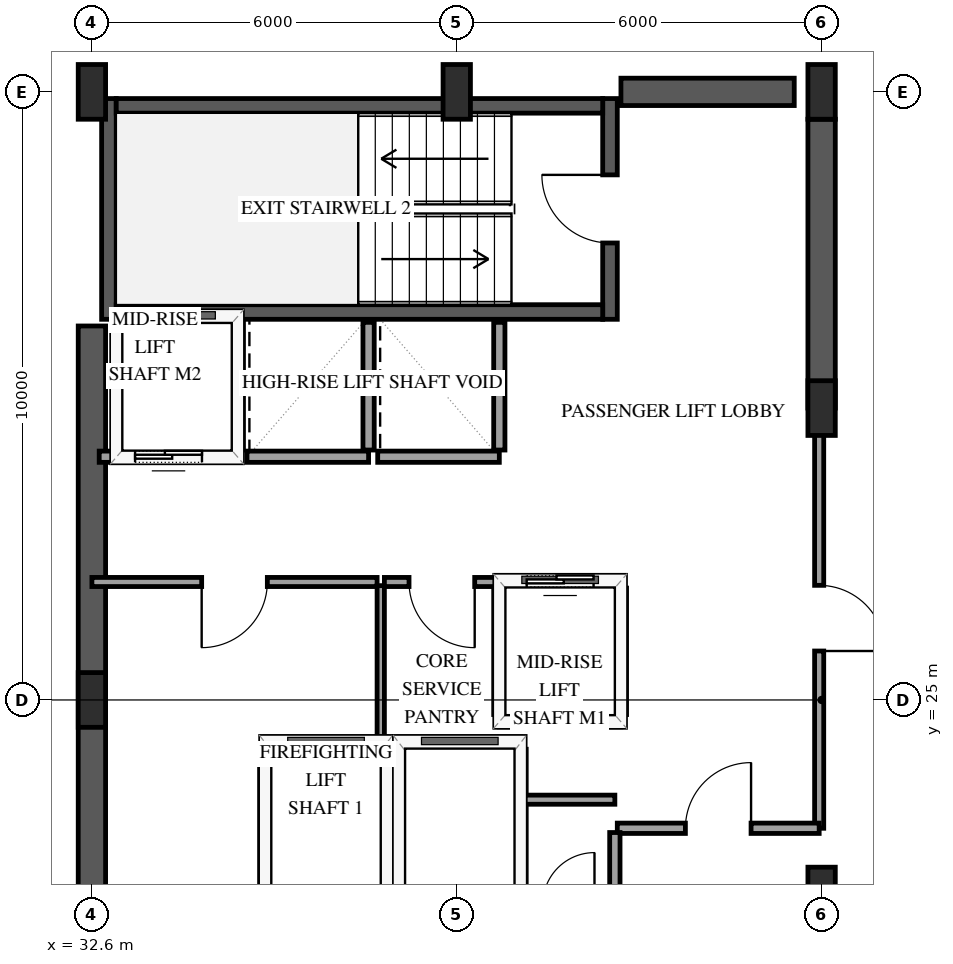
"""IFC4 building model, lengths in metres.
Left out: names, types, materials, properties, quantities, classifications, styles, units other than length and angle.
Written with IfcOpenShell. Run it as: python <this file> out.ifc"""

import sys

from ifc_helpers import new_model, si_unit, direction, frame, frame_2d, origin, origin_2d, place, context, subcontext, project, spatial, rectangle, extrude, element, fill, save


model = new_model("IFC4")
c1 = context("Model", 3, precision=1e-05, world=origin(), true_north=direction((0.0, 1.0)))
c2 = subcontext(c1, "Body", "Model", "MODEL_VIEW")
j1 = project(units=[si_unit("LENGTHUNIT", "METRE"), si_unit("PLANEANGLEUNIT", "RADIAN")], contexts=[c1])
p1 = place(None, origin())
s1 = spatial("IfcSite", under=j1, at=p1, CompositionType="ELEMENT")
p2 = place(p1, origin())
s2 = spatial("IfcBuilding", under=s1, at=p2, CompositionType="ELEMENT")
p3 = place(p2, frame((0.0, 0.0, 212.2)))
s3 = spatial("IfcBuildingStorey", under=s2, at=p3, CompositionType="ELEMENT", Elevation=212.2)
p4 = place(p3, frame((32.88, 31.26, 0.0), z_axis=(0.0, 0.0, 1.0), x_axis=(0.0, 1.0, 0.0)))
e1 = element("IfcWall", 1, at=p4, inside=s3, PredefinedType="SHEAR", context=c2, shape_type="SweptSolid", body=[
    extrude(rectangle(XDim=3.63, YDim=0.24, at=frame_2d((1.815, 0.0))), origin(), (0.0, 0.0, 1.0), 3.6),
])
p5 = place(p3, frame((41.12, 31.26, 0.0), z_axis=(0.0, 0.0, 1.0), x_axis=(0.0, 1.0, 0.0)))
e2 = element("IfcWall", 2, at=p5, inside=s3, PredefinedType="SHEAR", context=c2, shape_type="SweptSolid", body=[
    extrude(rectangle(XDim=3.63, YDim=0.24, at=frame_2d((1.815, 0.0))), origin(), (0.0, 0.0, 1.0), 3.6),
])
p6 = place(p5, frame((1.255, 0.0, 0.0)))
e3 = element("IfcOpeningElement", 3, at=p6, cuts=e2, PredefinedType="OPENING", context=c2, shape_type="SweptSolid", body=[
    extrude(rectangle(XDim=1.12, YDim=2.15, at=frame_2d((0.56, 1.075))), frame((0.0, 0.13, 0.0), z_axis=(0.0, -1.0, 0.0), x_axis=(1.0, 0.0, 0.0)), (0.0, 0.0, 1.0), 0.26),
])
for number, where, z_axis, x_axis in (
    (4, (33.0, 31.38, 0.0), (0.0, 0.0, 1.0), (1.0, 0.0, 0.0)),
    (5, (33.0, 34.77, 0.0), (0.0, 0.0, 1.0), (1.0, 0.0, 0.0)),
):
    element("IfcWall", number, at=place(p3, frame(where, z_axis=z_axis, x_axis=x_axis)), inside=s3, PredefinedType="SHEAR", context=c2, shape_type="SweptSolid", body=[
        extrude(rectangle(XDim=8.0, YDim=0.24, at=frame_2d((4.0, 0.0))), origin(), (0.0, 0.0, 1.0), 3.6),
    ])
p7 = place(p3, frame((32.6, 18.85, 0.0), z_axis=(0.0, 0.0, 1.0), x_axis=(0.0, 1.0, 0.0)))
e6 = element("IfcWall", 6, at=p7, inside=s3, PredefinedType="SHEAR", context=c2, shape_type="SweptSolid", body=[
    extrude(rectangle(XDim=12.3, YDim=0.45, at=frame_2d((6.15, 0.0))), origin(), (0.0, 0.0, 1.0), 3.6),
])
p8 = place(p3, frame((41.3, 35.0, 0.0), z_axis=(0.0, 0.0, 1.0), x_axis=(1.0, 0.0, 0.0)))
e7 = element("IfcWall", 7, at=p8, inside=s3, PredefinedType="SHEAR", context=c2, shape_type="SweptSolid", body=[
    extrude(rectangle(XDim=2.85, YDim=0.45, at=frame_2d((1.425, 0.0))), origin(), (0.0, 0.0, 1.0), 3.6),
])
p9 = place(p3, frame((44.6, 29.8, 0.0), z_axis=(0.0, 0.0, 1.0), x_axis=(0.0, 1.0, 0.0)))
e8 = element("IfcWall", 8, at=p9, inside=s3, PredefinedType="SHEAR", context=c2, shape_type="SweptSolid", body=[
    extrude(rectangle(XDim=4.75, YDim=0.45, at=frame_2d((2.375, 0.0))), origin(), (0.0, 0.0, 1.0), 3.6),
])
for number, where, z_axis, x_axis in (
    (9, (32.6, 25.0, 0.0), (0.0, 0.0, 1.0), (1.0, 0.0, 0.0)),
    (10, (32.6, 35.0, 0.0), (0.0, 0.0, 1.0), (1.0, 0.0, 0.0)),
    (11, (38.6, 35.0, 0.0), (0.0, 0.0, 1.0), (1.0, 0.0, 0.0)),
    (12, (44.6, 21.8, 0.0), (0.0, 0.0, 1.0), (1.0, 0.0, 0.0)),
    (13, (44.6, 29.8, 0.0), (0.0, 0.0, 1.0), (1.0, 0.0, 0.0)),
    (14, (44.6, 35.0, 0.0), (0.0, 0.0, 1.0), (1.0, 0.0, 0.0)),
):
    element("IfcColumn", number, at=place(p3, frame(where, z_axis=z_axis, x_axis=x_axis)), inside=s3, PredefinedType="PILASTER", context=c2, shape_type="SweptSolid", body=[
        extrude(rectangle(XDim=0.45, YDim=0.9, at=origin_2d()), origin(), (0.0, 0.0, 1.0), 3.6),
    ])
p10 = place(p3, frame((35.45, 24.3, 0.0), z_axis=(0.0, 0.0, 1.0), x_axis=(1.0, 0.0, 0.0)))
e15 = element("IfcWall", 15, at=p10, inside=s3, PredefinedType="SOLIDWALL", context=c2, shape_type="SweptSolid", body=[
    extrude(rectangle(XDim=2.0, YDim=0.185, at=frame_2d((1.0, 0.0))), origin(), (0.0, 0.0, 1.0), 3.3),
])
for number, where, z_axis, x_axis in (
    (16, (35.45, 21.81, 0.0), (0.0, 0.0, 1.0), (0.0, 1.0, 0.0)),
    (17, (37.45, 21.81, 0.0), (0.0, 0.0, 1.0), (0.0, 1.0, 0.0)),
):
    element("IfcWall", number, at=place(p3, frame(where, z_axis=z_axis, x_axis=x_axis)), inside=s3, PredefinedType="SOLIDWALL", context=c2, shape_type="SweptSolid", body=[
        extrude(rectangle(XDim=2.38, YDim=0.185, at=frame_2d((1.19, 0.0))), origin(), (0.0, 0.0, 1.0), 3.3),
    ])
p11 = place(p3, frame((37.65, 24.3, 0.0), z_axis=(0.0, 0.0, 1.0), x_axis=(1.0, 0.0, 0.0)))
e18 = element("IfcWall", 18, at=p11, inside=s3, PredefinedType="SOLIDWALL", context=c2, shape_type="SweptSolid", body=[
    extrude(rectangle(XDim=2.0, YDim=0.185, at=frame_2d((1.0, 0.0))), origin(), (0.0, 0.0, 1.0), 3.3),
])
p12 = place(p3, frame((39.65, 21.81, 0.0), z_axis=(0.0, 0.0, 1.0), x_axis=(0.0, 1.0, 0.0)))
e19 = element("IfcWall", 19, at=p12, inside=s3, PredefinedType="SOLIDWALL", context=c2, shape_type="SweptSolid", body=[
    extrude(rectangle(XDim=2.38, YDim=0.185, at=frame_2d((1.19, 0.0))), origin(), (0.0, 0.0, 1.0), 3.3),
])
p13 = place(p3, frame((39.3, 24.65, 0.0), z_axis=(0.0, 0.0, 1.0), x_axis=(1.0, 0.0, 0.0)))
e20 = element("IfcWall", 20, at=p13, inside=s3, PredefinedType="SOLIDWALL", context=c2, shape_type="SweptSolid", body=[
    extrude(rectangle(XDim=2.0, YDim=0.185, at=frame_2d((1.0, 0.0))), origin(), (0.0, 0.0, 1.0), 3.3),
])
p14 = place(p3, frame((39.3, 26.95, 0.0), z_axis=(0.0, 0.0, 1.0), x_axis=(1.0, 0.0, 0.0)))
e21 = element("IfcWall", 21, at=p14, inside=s3, PredefinedType="SOLIDWALL", context=c2, shape_type="SweptSolid", body=[
    extrude(rectangle(XDim=2.0, YDim=0.185, at=frame_2d((1.0, 0.0))), origin(), (0.0, 0.0, 1.0), 3.3),
])
p15 = place(p14, frame((0.45, 0.0, 0.0)))
e22 = element("IfcOpeningElement", 22, at=p15, cuts=e21, PredefinedType="OPENING", context=c2, shape_type="SweptSolid", body=[
    extrude(rectangle(XDim=1.1, YDim=2.15, at=frame_2d((0.55, 1.075))), frame((0.0, 0.103, 0.0), z_axis=(0.0, -1.0, 0.0), x_axis=(1.0, 0.0, 0.0)), (0.0, 0.0, 1.0), 0.205),
])
for number, where, z_axis, x_axis in (
    (23, (39.3, 24.76, 0.0), (0.0, 0.0, 1.0), (0.0, 1.0, 0.0)),
    (24, (41.3, 24.76, 0.0), (0.0, 0.0, 1.0), (0.0, 1.0, 0.0)),
):
    element("IfcWall", number, at=place(p3, frame(where, z_axis=z_axis, x_axis=x_axis)), inside=s3, PredefinedType="SOLIDWALL", context=c2, shape_type="SweptSolid", body=[
        extrude(rectangle(XDim=2.08, YDim=0.185, at=frame_2d((1.04, 0.0))), origin(), (0.0, 0.0, 1.0), 3.3),
    ])
p16 = place(p3, frame((32.72, 29.0, 0.0), z_axis=(0.0, 0.0, 1.0), x_axis=(1.0, 0.0, 0.0)))
e25 = element("IfcWall", 25, at=p16, inside=s3, PredefinedType="SOLIDWALL", context=c2, shape_type="SweptSolid", body=[
    extrude(rectangle(XDim=2.28, YDim=0.185, at=frame_2d((1.14, 0.0))), origin(), (0.0, 0.0, 1.0), 3.3),
])
p17 = place(p16, frame((0.59, 0.0, 0.0)))
e26 = element("IfcOpeningElement", 26, at=p17, cuts=e25, PredefinedType="OPENING", context=c2, shape_type="SweptSolid", body=[
    extrude(rectangle(XDim=1.1, YDim=2.15, at=frame_2d((0.55, 1.075))), frame((0.0, 0.103, 0.0), z_axis=(0.0, -1.0, 0.0), x_axis=(1.0, 0.0, 0.0)), (0.0, 0.0, 1.0), 0.205),
])
p18 = place(p3, frame((35.0, 29.11, 0.0), z_axis=(0.0, 0.0, 1.0), x_axis=(0.0, 1.0, 0.0)))
e27 = element("IfcWall", 27, at=p18, inside=s3, PredefinedType="SOLIDWALL", context=c2, shape_type="SweptSolid", body=[
    extrude(rectangle(XDim=2.1, YDim=0.185, at=frame_2d((1.05, 0.0))), origin(), (0.0, 0.0, 1.0), 3.3),
])
p19 = place(p3, frame((35.15, 29.0, 0.0), z_axis=(0.0, 0.0, 1.0), x_axis=(1.0, 0.0, 0.0)))
e28 = element("IfcWall", 28, at=p19, inside=s3, PredefinedType="SOLIDWALL", context=c2, shape_type="SweptSolid", body=[
    extrude(rectangle(XDim=2.0, YDim=0.185, at=frame_2d((1.0, 0.0))), origin(), (0.0, 0.0, 1.0), 3.3),
])
p20 = place(p3, frame((37.15, 29.11, 0.0), z_axis=(0.0, 0.0, 1.0), x_axis=(0.0, 1.0, 0.0)))
e29 = element("IfcWall", 29, at=p20, inside=s3, PredefinedType="SOLIDWALL", context=c2, shape_type="SweptSolid", body=[
    extrude(rectangle(XDim=2.1, YDim=0.185, at=frame_2d((1.05, 0.0))), origin(), (0.0, 0.0, 1.0), 3.3),
])
p21 = place(p3, frame((37.3, 29.0, 0.0), z_axis=(0.0, 0.0, 1.0), x_axis=(1.0, 0.0, 0.0)))
e30 = element("IfcWall", 30, at=p21, inside=s3, PredefinedType="SOLIDWALL", context=c2, shape_type="SweptSolid", body=[
    extrude(rectangle(XDim=2.0, YDim=0.185, at=frame_2d((1.0, 0.0))), origin(), (0.0, 0.0, 1.0), 3.3),
])
p22 = place(p3, frame((39.3, 29.11, 0.0), z_axis=(0.0, 0.0, 1.0), x_axis=(0.0, 1.0, 0.0)))
e31 = element("IfcWall", 31, at=p22, inside=s3, PredefinedType="SOLIDWALL", context=c2, shape_type="SweptSolid", body=[
    extrude(rectangle(XDim=2.1, YDim=0.185, at=frame_2d((1.05, 0.0))), origin(), (0.0, 0.0, 1.0), 3.3),
])
p23 = place(p3, frame((44.56, 29.8, 0.0), z_axis=(0.0, 0.0, 1.0), x_axis=(0.0, -1.0, 0.0)))
e32 = element("IfcWall", 32, at=p23, inside=s3, PredefinedType="PARTITIONING", context=c2, shape_type="SweptSolid", body=[
    extrude(rectangle(XDim=6.91, YDim=0.15, at=frame_2d((3.455, 0.0))), origin(), (0.0, 0.0, 1.0), 2.34),
])
p24 = place(p23, frame((2.915, 0.0, 0.0)))
e33 = element("IfcOpeningElement", 33, at=p24, cuts=e32, PredefinedType="OPENING", context=c2, shape_type="SweptSolid", body=[
    extrude(rectangle(XDim=1.08, YDim=2.15, at=frame_2d((0.54, 1.075))), frame((0.0, 0.085, 0.0), z_axis=(0.0, -1.0, 0.0), x_axis=(1.0, 0.0, 0.0)), (0.0, 0.0, 1.0), 0.17),
])
p25 = place(p3, frame((37.29, 26.94, 0.0), z_axis=(0.0, 0.0, 1.0), x_axis=(-1.0, 0.0, 0.0)))
e34 = element("IfcWall", 34, at=p25, inside=s3, PredefinedType="PARTITIONING", context=c2, shape_type="SweptSolid", body=[
    extrude(rectangle(XDim=4.69, YDim=0.15, at=frame_2d((2.345, 0.0))), origin(), (0.0, 0.0, 1.0), 3.3),
])
p26 = place(p25, frame((1.805, 0.0, 0.0)))
e35 = element("IfcOpeningElement", 35, at=p26, cuts=e34, PredefinedType="OPENING", context=c2, shape_type="SweptSolid", body=[
    extrude(rectangle(XDim=1.08, YDim=2.15, at=frame_2d((0.54, 1.075))), frame((0.0, 0.085, 0.0), z_axis=(0.0, -1.0, 0.0), x_axis=(1.0, 0.0, 0.0)), (0.0, 0.0, 1.0), 0.17),
])
p27 = place(p3, frame((41.24, 22.89, 0.0), z_axis=(0.0, 0.0, 1.0), x_axis=(1.0, 0.0, 0.0)))
e36 = element("IfcWall", 36, at=p27, inside=s3, PredefinedType="PARTITIONING", context=c2, shape_type="SweptSolid", body=[
    extrude(rectangle(XDim=3.32, YDim=0.17, at=frame_2d((1.66, 0.0))), origin(), (0.0, 0.0, 1.0), 3.3),
])
p28 = place(p27, frame((1.12, 0.0, 0.0)))
e37 = element("IfcOpeningElement", 37, at=p28, cuts=e36, PredefinedType="OPENING", context=c2, shape_type="SweptSolid", body=[
    extrude(rectangle(XDim=1.08, YDim=2.15, at=frame_2d((0.54, 1.075))), frame((0.0, 0.095, 0.0), z_axis=(0.0, -1.0, 0.0), x_axis=(1.0, 0.0, 0.0)), (0.0, 0.0, 1.0), 0.19),
])
p29 = place(p3, frame((37.35, 26.88, 0.0), z_axis=(0.0, 0.0, 1.0), x_axis=(0.0, -1.0, 0.0)))
e38 = element("IfcWall", 38, at=p29, inside=s3, PredefinedType="PARTITIONING", context=c2, shape_type="SweptSolid", body=[
    extrude(rectangle(XDim=2.58, YDim=0.12, at=frame_2d((1.29, 0.0))), origin(), (0.0, 0.0, 1.0), 3.3),
])
p30 = place(p3, frame((39.3, 26.94, 0.0), z_axis=(0.0, 0.0, 1.0), x_axis=(-1.0, 0.0, 0.0)))
e39 = element("IfcWall", 39, at=p30, inside=s3, PredefinedType="PARTITIONING", context=c2, shape_type="SweptSolid", body=[
    extrude(rectangle(XDim=1.89, YDim=0.15, at=frame_2d((0.945, 0.0))), origin(), (0.0, 0.0, 1.0), 3.3),
])
p31 = place(p30, frame((0.405, 0.0, 0.0)))
e40 = element("IfcOpeningElement", 40, at=p31, cuts=e39, PredefinedType="OPENING", context=c2, shape_type="SweptSolid", body=[
    extrude(rectangle(XDim=1.08, YDim=2.15, at=frame_2d((0.54, 1.075))), frame((0.0, 0.085, 0.0), z_axis=(0.0, -1.0, 0.0), x_axis=(1.0, 0.0, 0.0)), (0.0, 0.0, 1.0), 0.17),
])
p32 = place(p3, frame((41.2, 21.7, 0.0), z_axis=(0.0, 0.0, 1.0), x_axis=(0.0, 1.0, 0.0)))
e41 = element("IfcWall", 41, at=p32, inside=s3, PredefinedType="PARTITIONING", context=c2, shape_type="SweptSolid", body=[
    extrude(rectangle(XDim=1.12, YDim=0.17, at=frame_2d((0.56, 0.0))), origin(), (0.0, 0.0, 1.0), 3.3),
])
p33 = place(p3, frame((41.2, 23.36, 0.0), z_axis=(0.0, 0.0, 1.0), x_axis=(-1.0, 0.0, 0.0)))
e42 = element("IfcWall", 42, at=p33, inside=s3, PredefinedType="PARTITIONING", context=c2, shape_type="SweptSolid", body=[
    extrude(rectangle(XDim=1.48, YDim=0.15, at=frame_2d((0.74, 0.0))), origin(), (0.0, 0.0, 1.0), 3.3),
])
p34 = place(p15, origin())
e43 = element("IfcDoor", 43, at=p34, inside=s3, OperationType="SLIDING_TO_LEFT", PredefinedType="DOOR", context=c2, shape_type="SweptSolid", body=[
    extrude(rectangle(XDim=1.1, YDim=2.15, at=frame_2d((0.55, 1.075))), frame((0.0, 0.025, 0.0), z_axis=(0.0, -1.0, 0.0), x_axis=(1.0, 0.0, 0.0)), (0.0, 0.0, 1.0), 0.05),
])
fill(e22, e43)
p35 = place(p17, origin())
e44 = element("IfcDoor", 44, at=p35, inside=s3, OperationType="SLIDING_TO_LEFT", PredefinedType="DOOR", context=c2, shape_type="SweptSolid", body=[
    extrude(rectangle(XDim=1.1, YDim=2.15, at=frame_2d((0.55, 1.075))), frame((0.0, 0.025, 0.0), z_axis=(0.0, -1.0, 0.0), x_axis=(1.0, 0.0, 0.0)), (0.0, 0.0, 1.0), 0.05),
])
fill(e26, e44)
p36 = place(p6, origin())
e45 = element("IfcDoor", 45, at=p36, inside=s3, OperationType="SINGLE_SWING_RIGHT", PredefinedType="DOOR", context=c2, shape_type="SweptSolid", body=[
    extrude(rectangle(XDim=1.12, YDim=2.15, at=frame_2d((0.56, 1.075))), frame((0.0, 0.025, 0.0), z_axis=(0.0, -1.0, 0.0), x_axis=(1.0, 0.0, 0.0)), (0.0, 0.0, 1.0), 0.05),
])
fill(e3, e45)
p37 = place(p24, origin())
e46 = element("IfcDoor", 46, at=p37, inside=s3, OperationType="SINGLE_SWING_RIGHT", PredefinedType="DOOR", context=c2, shape_type="SweptSolid", body=[
    extrude(rectangle(XDim=1.08, YDim=2.15, at=frame_2d((0.54, 1.075))), frame((0.0, 0.025, 0.0), z_axis=(0.0, -1.0, 0.0), x_axis=(1.0, 0.0, 0.0)), (0.0, 0.0, 1.0), 0.05),
])
fill(e33, e46)
p38 = place(p26, origin())
e47 = element("IfcDoor", 47, at=p38, inside=s3, OperationType="SINGLE_SWING_RIGHT", PredefinedType="DOOR", context=c2, shape_type="SweptSolid", body=[
    extrude(rectangle(XDim=1.08, YDim=2.15, at=frame_2d((0.54, 1.075))), frame((0.0, 0.025, 0.0), z_axis=(0.0, -1.0, 0.0), x_axis=(1.0, 0.0, 0.0)), (0.0, 0.0, 1.0), 0.05),
])
fill(e35, e47)
p39 = place(p28, origin())
e48 = element("IfcDoor", 48, at=p39, inside=s3, OperationType="SINGLE_SWING_RIGHT", PredefinedType="DOOR", context=c2, shape_type="SweptSolid", body=[
    extrude(rectangle(XDim=1.08, YDim=2.15, at=frame_2d((0.54, 1.075))), frame((0.0, 0.025, 0.0), z_axis=(0.0, -1.0, 0.0), x_axis=(1.0, 0.0, 0.0)), (0.0, 0.0, 1.0), 0.05),
])
fill(e37, e48)
p40 = place(p31, origin())
e49 = element("IfcDoor", 49, at=p40, inside=s3, OperationType="SINGLE_SWING_LEFT", PredefinedType="DOOR", context=c2, shape_type="SweptSolid", body=[
    extrude(rectangle(XDim=1.08, YDim=2.15, at=frame_2d((0.54, 1.075))), frame((0.0, 0.025, 0.0), z_axis=(0.0, -1.0, 0.0), x_axis=(1.0, 0.0, 0.0)), (0.0, 0.0, 1.0), 0.05),
])
fill(e40, e49)
save(model, sys.argv[1])
